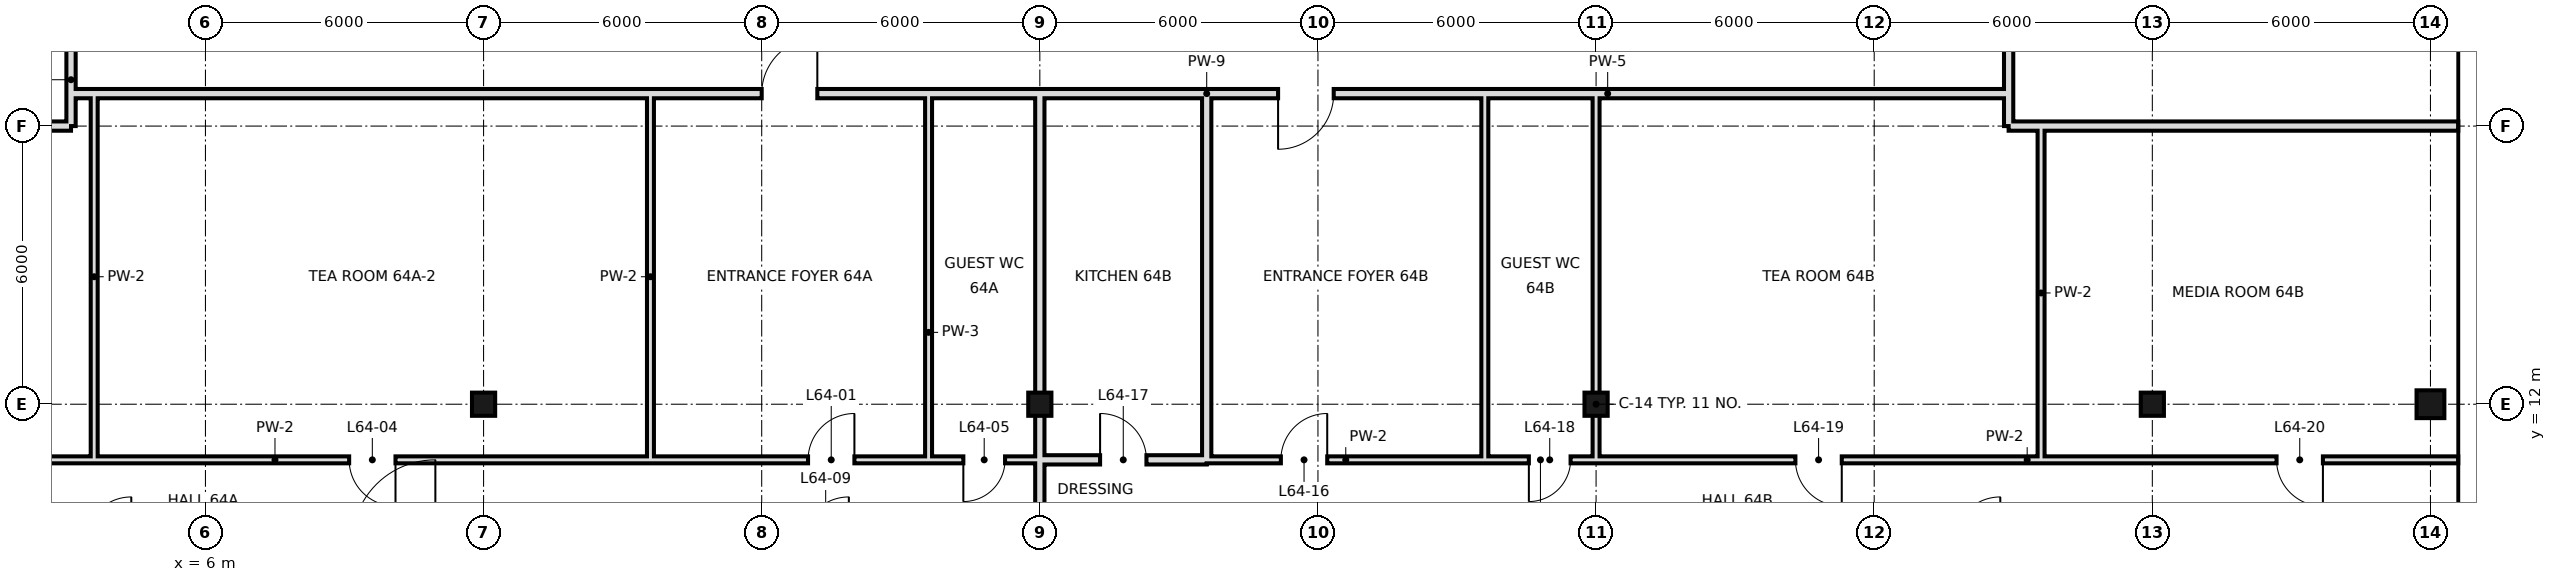
"""IFC4 building model, lengths in metres.
Left out: names, types, materials, properties, quantities, classifications, styles, units other than length and angle.
Written with IfcOpenShell. Run it as: python <this file> out.ifc"""

import sys

from ifc_helpers import new_model, si_unit, direction, frame, frame_2d, origin, origin_2d, place, context, subcontext, project, spatial, rectangle, hollow_rectangle, extrude, element, fill, save


model = new_model("IFC4")
c1 = context("Model", 3, precision=1e-05, world=origin(), true_north=direction((0.0, 1.0)))
c2 = subcontext(c1, "Body", "Model", "MODEL_VIEW")
j1 = project(units=[si_unit("LENGTHUNIT", "METRE"), si_unit("PLANEANGLEUNIT", "RADIAN")], contexts=[c1])
p1 = place(None, origin())
s1 = spatial("IfcSite", under=j1, at=p1, CompositionType="ELEMENT")
p2 = place(p1, origin())
s2 = spatial("IfcBuilding", under=s1, at=p2, CompositionType="ELEMENT")
p3 = place(p2, frame((0.0, 0.0, 270.2)))
s3 = spatial("IfcBuildingStorey", under=s2, at=p3, CompositionType="ELEMENT", Elevation=270.2)
for number, where, z_axis, x_axis in (
    (1, (12.0, 12.0, 0.0), (0.0, 0.0, 1.0), (1.0, 0.0, 0.0)),
    (2, (24.0, 12.0, 0.0), (0.0, 0.0, 1.0), (1.0, 0.0, 0.0)),
    (3, (36.0, 12.0, 0.0), (0.0, 0.0, 1.0), (1.0, 0.0, 0.0)),
    (4, (48.0, 12.0, 0.0), (0.0, 0.0, 1.0), (1.0, 0.0, 0.0)),
):
    element("IfcColumn", number, at=place(p3, frame(where, z_axis=z_axis, x_axis=x_axis)), inside=s3, PredefinedType="COLUMN", context=c2, shape_type="SweptSolid", body=[
        extrude(hollow_rectangle(XDim=0.5, YDim=0.5, WallThickness=0.025, at=origin_2d()), origin(), (0.0, 0.0, 1.0), 3.6),
    ])
p4 = place(p3, frame((54.0, 12.0, 0.0), z_axis=(0.0, 0.0, 1.0), x_axis=(1.0, 0.0, 0.0)))
e5 = element("IfcColumn", 5, at=p4, inside=s3, PredefinedType="COLUMN", context=c2, shape_type="SweptSolid", body=[
    extrude(hollow_rectangle(XDim=0.6, YDim=0.6, WallThickness=0.028, at=origin_2d()), origin(), (0.0, 0.0, 1.0), 3.6),
])
for number, where, z_axis, x_axis in (
    (6, (15.6, 10.8, 0.0), (0.0, 0.0, 1.0), (0.0, 1.0, 0.0)),
    (7, (21.6, 10.8, 0.0), (0.0, 0.0, 1.0), (0.0, 1.0, 0.0)),
):
    element("IfcWall", number, at=place(p3, frame(where, z_axis=z_axis, x_axis=x_axis)), inside=s3, PredefinedType="PARTITIONING", context=c2, shape_type="SweptSolid", body=[
        extrude(rectangle(XDim=7.9, YDim=0.15, at=frame_2d((3.95, 0.0))), origin(), (0.0, 0.0, 1.0), 3.42),
    ])
p5 = place(p3, frame((24.0, 10.8, 0.0), z_axis=(0.0, 0.0, 1.0), x_axis=(0.0, 1.0, 0.0)))
e8 = element("IfcWall", 8, at=p5, inside=s3, PredefinedType="SOLIDWALL", context=c2, shape_type="SweptSolid", body=[
    extrude(rectangle(XDim=7.9, YDim=0.2, at=frame_2d((3.95, 0.0))), origin(), (0.0, 0.0, 1.0), 2.72),
])
p6 = place(p3, frame((24.0, 0.0, 0.0), z_axis=(0.0, 0.0, 1.0), x_axis=(0.0, 1.0, 0.0)))
e9 = element("IfcWall", 9, at=p6, inside=s3, PredefinedType="SOLIDWALL", context=c2, shape_type="SweptSolid", body=[
    extrude(rectangle(XDim=10.8, YDim=0.2, at=frame_2d((5.4, 0.0))), origin(), (0.0, 0.0, 1.0), 2.72),
])
p7 = place(p3, frame((27.6, 10.8, 0.0), z_axis=(0.0, 0.0, 1.0), x_axis=(0.0, 1.0, 0.0)))
e10 = element("IfcWall", 10, at=p7, inside=s3, PredefinedType="SOLIDWALL", context=c2, shape_type="SweptSolid", body=[
    extrude(rectangle(XDim=7.9, YDim=0.2, at=frame_2d((3.95, 0.0))), origin(), (0.0, 0.0, 1.0), 2.72),
])
p8 = place(p3, frame((3.1, 18.7, 0.0), z_axis=(0.0, 0.0, 1.0), x_axis=(0.0, 1.0, 0.0)))
e11 = element("IfcWall", 11, at=p8, inside=s3, PredefinedType="SOLIDWALL", context=c2, shape_type="SweptSolid", body=[
    extrude(rectangle(XDim=21.5, YDim=0.2, at=frame_2d((10.75, 0.0))), origin(), (0.0, 0.0, 1.0), 2.97),
])
p9 = place(p8, frame((6.5, 0.0, 0.0)))
e12 = element("IfcOpeningElement", 12, at=p9, cuts=e11, PredefinedType="OPENING", context=c2, shape_type="SweptSolid", body=[
    extrude(rectangle(XDim=1.2, YDim=2.4, at=frame_2d((0.6, 1.2))), frame((0.0, 0.11, 0.0), z_axis=(0.0, -1.0, 0.0), x_axis=(1.0, 0.0, 0.0)), (0.0, 0.0, 1.0), 0.22),
])
p10 = place(p3, frame((3.1, 18.0, 0.0), z_axis=(0.0, 0.0, 1.0), x_axis=(0.0, 1.0, 0.0)))
e13 = element("IfcWall", 13, at=p10, inside=s3, PredefinedType="SOLIDWALL", context=c2, shape_type="SweptSolid", body=[
    extrude(rectangle(XDim=0.7, YDim=0.2, at=frame_2d((0.35, 0.0))), origin(), (0.0, 0.0, 1.0), 2.97),
])
for number, where, z_axis, x_axis in (
    (14, (3.6, 10.8, 0.0), (0.0, 0.0, 1.0), (0.0, 1.0, 0.0)),
    (15, (33.6, 10.8, 0.0), (0.0, 0.0, 1.0), (0.0, 1.0, 0.0)),
):
    element("IfcWall", number, at=place(p3, frame(where, z_axis=z_axis, x_axis=x_axis)), inside=s3, PredefinedType="PARTITIONING", context=c2, shape_type="SweptSolid", body=[
        extrude(rectangle(XDim=7.9, YDim=0.15, at=frame_2d((3.95, 0.0))), origin(), (0.0, 0.0, 1.0), 3.42),
    ])
p11 = place(p3, frame((36.0, 10.8, 0.0), z_axis=(0.0, 0.0, 1.0), x_axis=(0.0, 1.0, 0.0)))
e16 = element("IfcWall", 16, at=p11, inside=s3, PredefinedType="PARTITIONING", context=c2, shape_type="SweptSolid", body=[
    extrude(rectangle(XDim=7.9, YDim=0.15, at=frame_2d((3.95, 0.0))), origin(), (0.0, 0.0, 1.0), 2.72),
])
p12 = place(p3, frame((44.9, 18.0, 0.0), z_axis=(0.0, 0.0, 1.0), x_axis=(0.0, 1.0, 0.0)))
e17 = element("IfcWall", 17, at=p12, inside=s3, PredefinedType="SOLIDWALL", context=c2, shape_type="SweptSolid", body=[
    extrude(rectangle(XDim=30.6, YDim=0.2, at=frame_2d((15.3, 0.0))), origin(), (0.0, 0.0, 1.0), 2.72),
])
p13 = place(p12, frame((20.27, 0.0, 0.0)))
e18 = element("IfcOpeningElement", 18, at=p13, cuts=e17, PredefinedType="OPENING", context=c2, shape_type="SweptSolid", body=[
    extrude(rectangle(XDim=1.2, YDim=2.4, at=frame_2d((0.6, 1.2))), frame((0.0, 0.11, 0.0), z_axis=(0.0, -1.0, 0.0), x_axis=(1.0, 0.0, 0.0)), (0.0, 0.0, 1.0), 0.22),
])
p14 = place(p3, frame((45.6, 10.8, 0.0), z_axis=(0.0, 0.0, 1.0), x_axis=(0.0, 1.0, 0.0)))
e19 = element("IfcWall", 19, at=p14, inside=s3, PredefinedType="PARTITIONING", context=c2, shape_type="SweptSolid", body=[
    extrude(rectangle(XDim=7.2, YDim=0.15, at=frame_2d((3.6, 0.0))), origin(), (0.0, 0.0, 1.0), 3.42),
])
p15 = place(p3, frame((24.0, 10.8, 0.0), z_axis=(0.0, 0.0, 1.0), x_axis=(1.0, 0.0, 0.0)))
e20 = element("IfcWall", 20, at=p15, inside=s3, PredefinedType="SOLIDWALL", context=c2, shape_type="SweptSolid", body=[
    extrude(rectangle(XDim=3.6, YDim=0.2, at=frame_2d((1.8, 0.0))), origin(), (0.0, 0.0, 1.0), 2.72),
])
p16 = place(p15, frame((1.3, 0.0, 0.0)))
e21 = element("IfcOpeningElement", 21, at=p16, cuts=e20, PredefinedType="OPENING", context=c2, shape_type="SweptSolid", body=[
    extrude(rectangle(XDim=1.0, YDim=2.4, at=frame_2d((0.5, 1.2))), frame((0.0, 0.11, 0.0), z_axis=(0.0, -1.0, 0.0), x_axis=(1.0, 0.0, 0.0)), (0.0, 0.0, 1.0), 0.22),
])
p17 = place(p3, frame((-6.6, 10.8, 0.0), z_axis=(0.0, 0.0, 1.0), x_axis=(1.0, 0.0, 0.0)))
e22 = element("IfcWall", 22, at=p17, inside=s3, PredefinedType="PARTITIONING", context=c2, shape_type="SweptSolid", body=[
    extrude(rectangle(XDim=28.2, YDim=0.15, at=frame_2d((14.1, 0.0))), origin(), (0.0, 0.0, 1.0), 3.42),
])
p18 = place(p17, frame((25.6, 0.0, 0.0)))
e23 = element("IfcOpeningElement", 23, at=p18, cuts=e22, PredefinedType="OPENING", context=c2, shape_type="SweptSolid", body=[
    extrude(rectangle(XDim=1.0, YDim=2.4, at=frame_2d((0.5, 1.2))), frame((0.0, 0.085, 0.0), z_axis=(0.0, -1.0, 0.0), x_axis=(1.0, 0.0, 0.0)), (0.0, 0.0, 1.0), 0.17),
])
p19 = place(p17, frame((4.6, 0.0, 0.0)))
e24 = element("IfcOpeningElement", 24, at=p19, cuts=e22, PredefinedType="OPENING", context=c2, shape_type="SweptSolid", body=[
    extrude(rectangle(XDim=1.0, YDim=2.4, at=frame_2d((0.5, 1.2))), frame((0.0, 0.085, 0.0), z_axis=(0.0, -1.0, 0.0), x_axis=(1.0, 0.0, 0.0)), (0.0, 0.0, 1.0), 0.17),
])
p20 = place(p17, frame((15.7, 0.0, 0.0)))
e25 = element("IfcOpeningElement", 25, at=p20, cuts=e22, PredefinedType="OPENING", context=c2, shape_type="SweptSolid", body=[
    extrude(rectangle(XDim=1.0, YDim=2.4, at=frame_2d((0.5, 1.2))), frame((0.0, 0.085, 0.0), z_axis=(0.0, -1.0, 0.0), x_axis=(1.0, 0.0, 0.0)), (0.0, 0.0, 1.0), 0.17),
])
p21 = place(p3, frame((27.6, 10.8, 0.0), z_axis=(0.0, 0.0, 1.0), x_axis=(1.0, 0.0, 0.0)))
e26 = element("IfcWall", 26, at=p21, inside=s3, PredefinedType="PARTITIONING", context=c2, shape_type="SweptSolid", body=[
    extrude(rectangle(XDim=6.0, YDim=0.15, at=frame_2d((3.0, 0.0))), origin(), (0.0, 0.0, 1.0), 3.42),
])
p22 = place(p21, frame((1.6, 0.0, 0.0)))
e27 = element("IfcOpeningElement", 27, at=p22, cuts=e26, PredefinedType="OPENING", context=c2, shape_type="SweptSolid", body=[
    extrude(rectangle(XDim=1.0, YDim=2.4, at=frame_2d((0.5, 1.2))), frame((0.0, 0.085, 0.0), z_axis=(0.0, -1.0, 0.0), x_axis=(1.0, 0.0, 0.0)), (0.0, 0.0, 1.0), 0.17),
])
p23 = place(p3, frame((36.0, 10.8, 0.0), z_axis=(0.0, 0.0, 1.0), x_axis=(1.0, 0.0, 0.0)))
e28 = element("IfcWall", 28, at=p23, inside=s3, PredefinedType="PARTITIONING", context=c2, shape_type="SweptSolid", body=[
    extrude(rectangle(XDim=18.6, YDim=0.15, at=frame_2d((9.3, 0.0))), origin(), (0.0, 0.0, 1.0), 3.42),
])
p24 = place(p23, frame((4.3, 0.0, 0.0)))
e29 = element("IfcOpeningElement", 29, at=p24, cuts=e28, PredefinedType="OPENING", context=c2, shape_type="SweptSolid", body=[
    extrude(rectangle(XDim=1.0, YDim=2.4, at=frame_2d((0.5, 1.2))), frame((0.0, 0.085, 0.0), z_axis=(0.0, -1.0, 0.0), x_axis=(1.0, 0.0, 0.0)), (0.0, 0.0, 1.0), 0.17),
])
p25 = place(p23, frame((14.68, 0.0, 0.0)))
e30 = element("IfcOpeningElement", 30, at=p25, cuts=e28, PredefinedType="OPENING", context=c2, shape_type="SweptSolid", body=[
    extrude(rectangle(XDim=1.0, YDim=2.4, at=frame_2d((0.5, 1.2))), frame((0.0, 0.085, 0.0), z_axis=(0.0, -1.0, 0.0), x_axis=(1.0, 0.0, 0.0)), (0.0, 0.0, 1.0), 0.17),
])
p26 = place(p3, frame((21.6, 10.8, 0.0), z_axis=(0.0, 0.0, 1.0), x_axis=(1.0, 0.0, 0.0)))
e31 = element("IfcWall", 31, at=p26, inside=s3, PredefinedType="PARTITIONING", context=c2, shape_type="SweptSolid", body=[
    extrude(rectangle(XDim=2.4, YDim=0.15, at=frame_2d((1.2, 0.0))), origin(), (0.0, 0.0, 1.0), 3.42),
])
p27 = place(p26, frame((0.75, 0.0, 0.0)))
e32 = element("IfcOpeningElement", 32, at=p27, cuts=e31, PredefinedType="OPENING", context=c2, shape_type="SweptSolid", body=[
    extrude(rectangle(XDim=0.9, YDim=2.4, at=frame_2d((0.45, 1.2))), frame((0.0, 0.085, 0.0), z_axis=(0.0, -1.0, 0.0), x_axis=(1.0, 0.0, 0.0)), (0.0, 0.0, 1.0), 0.17),
])
p28 = place(p3, frame((33.6, 10.8, 0.0), z_axis=(0.0, 0.0, 1.0), x_axis=(1.0, 0.0, 0.0)))
e33 = element("IfcWall", 33, at=p28, inside=s3, PredefinedType="PARTITIONING", context=c2, shape_type="SweptSolid", body=[
    extrude(rectangle(XDim=2.4, YDim=0.15, at=frame_2d((1.2, 0.0))), origin(), (0.0, 0.0, 1.0), 3.42),
])
p29 = place(p28, frame((0.95, 0.0, 0.0)))
e34 = element("IfcOpeningElement", 34, at=p29, cuts=e33, PredefinedType="OPENING", context=c2, shape_type="SweptSolid", body=[
    extrude(rectangle(XDim=0.9, YDim=2.4, at=frame_2d((0.45, 1.2))), frame((0.0, 0.085, 0.0), z_axis=(0.0, -1.0, 0.0), x_axis=(1.0, 0.0, 0.0)), (0.0, 0.0, 1.0), 0.17),
])
for number, where, z_axis, x_axis in (
    (35, (44.9, 18.0, 0.0), (0.0, 0.0, 1.0), (1.0, 0.0, 0.0)),
    (36, (-6.6, 18.0, 0.0), (0.0, 0.0, 1.0), (1.0, 0.0, 0.0)),
):
    element("IfcWall", number, at=place(p3, frame(where, z_axis=z_axis, x_axis=x_axis)), inside=s3, PredefinedType="SOLIDWALL", context=c2, shape_type="SweptSolid", body=[
        extrude(rectangle(XDim=9.7, YDim=0.2, at=frame_2d((4.85, 0.0))), origin(), (0.0, 0.0, 1.0), 2.72),
    ])
p30 = place(p3, frame((3.1, 18.7, 0.0), z_axis=(0.0, 0.0, 1.0), x_axis=(1.0, 0.0, 0.0)))
e37 = element("IfcWall", 37, at=p30, inside=s3, PredefinedType="SOLIDWALL", context=c2, shape_type="SweptSolid", body=[
    extrude(rectangle(XDim=20.9, YDim=0.2, at=frame_2d((10.45, 0.0))), origin(), (0.0, 0.0, 1.0), 2.72),
])
p31 = place(p30, frame((14.9, 0.0, 0.0)))
e38 = element("IfcOpeningElement", 38, at=p31, cuts=e37, PredefinedType="OPENING", context=c2, shape_type="SweptSolid", body=[
    extrude(rectangle(XDim=1.2, YDim=2.4, at=frame_2d((0.6, 1.2))), frame((0.0, 0.11, 0.0), z_axis=(0.0, -1.0, 0.0), x_axis=(1.0, 0.0, 0.0)), (0.0, 0.0, 1.0), 0.22),
])
p32 = place(p3, frame((27.6, 18.7, 0.0), z_axis=(0.0, 0.0, 1.0), x_axis=(1.0, 0.0, 0.0)))
e39 = element("IfcWall", 39, at=p32, inside=s3, PredefinedType="SOLIDWALL", context=c2, shape_type="SweptSolid", body=[
    extrude(rectangle(XDim=17.3, YDim=0.2, at=frame_2d((8.65, 0.0))), origin(), (0.0, 0.0, 1.0), 2.72),
])
p33 = place(p32, frame((1.54, 0.0, 0.0)))
e40 = element("IfcOpeningElement", 40, at=p33, cuts=e39, PredefinedType="OPENING", context=c2, shape_type="SweptSolid", body=[
    extrude(rectangle(XDim=1.2, YDim=2.4, at=frame_2d((0.6, 1.2))), frame((0.0, 0.11, 0.0), z_axis=(0.0, -1.0, 0.0), x_axis=(1.0, 0.0, 0.0)), (0.0, 0.0, 1.0), 0.22),
])
p34 = place(p3, frame((24.0, 18.7, 0.0), z_axis=(0.0, 0.0, 1.0), x_axis=(1.0, 0.0, 0.0)))
e41 = element("IfcWall", 41, at=p34, inside=s3, PredefinedType="SOLIDWALL", context=c2, shape_type="SweptSolid", body=[
    extrude(rectangle(XDim=3.6, YDim=0.2, at=frame_2d((1.8, 0.0))), origin(), (0.0, 0.0, 1.0), 3.42),
])
p35 = place(p18, frame((1.0, 0.0, 0.0), z_axis=(0.0, 0.0, 1.0), x_axis=(-1.0, 0.0, 0.0)))
e42 = element("IfcDoor", 42, at=p35, inside=s3, OperationType="SINGLE_SWING_LEFT", PredefinedType="DOOR", context=c2, shape_type="SweptSolid", body=[
    extrude(rectangle(XDim=1.0, YDim=2.4, at=frame_2d((0.5, 1.2))), frame((0.0, 0.025, 0.0), z_axis=(0.0, -1.0, 0.0), x_axis=(1.0, 0.0, 0.0)), (0.0, 0.0, 1.0), 0.05),
])
fill(e23, e42)
p36 = place(p20, origin())
e43 = element("IfcDoor", 43, at=p36, inside=s3, OperationType="SINGLE_SWING_RIGHT", PredefinedType="DOOR", context=c2, shape_type="SweptSolid", body=[
    extrude(rectangle(XDim=1.0, YDim=2.4, at=frame_2d((0.5, 1.2))), frame((0.0, 0.025, 0.0), z_axis=(0.0, -1.0, 0.0), x_axis=(1.0, 0.0, 0.0)), (0.0, 0.0, 1.0), 0.05),
])
fill(e25, e43)
p37 = place(p27, frame((0.9, 0.0, 0.0), z_axis=(0.0, 0.0, 1.0), x_axis=(-1.0, 0.0, 0.0)))
e44 = element("IfcDoor", 44, at=p37, inside=s3, OperationType="SINGLE_SWING_RIGHT", PredefinedType="DOOR", context=c2, shape_type="SweptSolid", body=[
    extrude(rectangle(XDim=0.9, YDim=2.4, at=frame_2d((0.45, 1.2))), frame((0.0, 0.025, 0.0), z_axis=(0.0, -1.0, 0.0), x_axis=(1.0, 0.0, 0.0)), (0.0, 0.0, 1.0), 0.05),
])
fill(e32, e44)
p38 = place(p22, frame((1.0, 0.0, 0.0), z_axis=(0.0, 0.0, 1.0), x_axis=(-1.0, 0.0, 0.0)))
e45 = element("IfcDoor", 45, at=p38, inside=s3, OperationType="SINGLE_SWING_LEFT", PredefinedType="DOOR", context=c2, shape_type="SweptSolid", body=[
    extrude(rectangle(XDim=1.0, YDim=2.4, at=frame_2d((0.5, 1.2))), frame((0.0, 0.025, 0.0), z_axis=(0.0, -1.0, 0.0), x_axis=(1.0, 0.0, 0.0)), (0.0, 0.0, 1.0), 0.05),
])
fill(e27, e45)
p39 = place(p16, origin())
e46 = element("IfcDoor", 46, at=p39, inside=s3, OperationType="SINGLE_SWING_LEFT", PredefinedType="DOOR", context=c2, shape_type="SweptSolid", body=[
    extrude(rectangle(XDim=1.0, YDim=2.4, at=frame_2d((0.5, 1.2))), frame((0.0, 0.025, 0.0), z_axis=(0.0, -1.0, 0.0), x_axis=(1.0, 0.0, 0.0)), (0.0, 0.0, 1.0), 0.05),
])
fill(e21, e46)
p40 = place(p29, frame((0.9, 0.0, 0.0), z_axis=(0.0, 0.0, 1.0), x_axis=(-1.0, 0.0, 0.0)))
e47 = element("IfcDoor", 47, at=p40, inside=s3, OperationType="SINGLE_SWING_RIGHT", PredefinedType="DOOR", context=c2, shape_type="SweptSolid", body=[
    extrude(rectangle(XDim=0.9, YDim=2.4, at=frame_2d((0.45, 1.2))), frame((0.0, 0.025, 0.0), z_axis=(0.0, -1.0, 0.0), x_axis=(1.0, 0.0, 0.0)), (0.0, 0.0, 1.0), 0.05),
])
fill(e34, e47)
p41 = place(p24, origin())
e48 = element("IfcDoor", 48, at=p41, inside=s3, OperationType="SINGLE_SWING_RIGHT", PredefinedType="DOOR", context=c2, shape_type="SweptSolid", body=[
    extrude(rectangle(XDim=1.0, YDim=2.4, at=frame_2d((0.5, 1.2))), frame((0.0, 0.025, 0.0), z_axis=(0.0, -1.0, 0.0), x_axis=(1.0, 0.0, 0.0)), (0.0, 0.0, 1.0), 0.05),
])
fill(e29, e48)
p42 = place(p25, origin())
e49 = element("IfcDoor", 49, at=p42, inside=s3, OperationType="SINGLE_SWING_RIGHT", PredefinedType="DOOR", context=c2, shape_type="SweptSolid", body=[
    extrude(rectangle(XDim=1.0, YDim=2.4, at=frame_2d((0.5, 1.2))), frame((0.0, 0.025, 0.0), z_axis=(0.0, -1.0, 0.0), x_axis=(1.0, 0.0, 0.0)), (0.0, 0.0, 1.0), 0.05),
])
fill(e30, e49)
p43 = place(p31, frame((1.2, 0.0, 0.0), z_axis=(0.0, 0.0, 1.0), x_axis=(-1.0, 0.0, 0.0)))
e50 = element("IfcDoor", 50, at=p43, inside=s3, OperationType="SINGLE_SWING_LEFT", PredefinedType="DOOR", context=c2, shape_type="SweptSolid", body=[
    extrude(rectangle(XDim=1.2, YDim=2.4, at=frame_2d((0.6, 1.2))), frame((0.0, 0.025, 0.0), z_axis=(0.0, -1.0, 0.0), x_axis=(1.0, 0.0, 0.0)), (0.0, 0.0, 1.0), 0.05),
])
fill(e38, e50)
p44 = place(p33, frame((1.2, 0.0, 0.0), z_axis=(0.0, 0.0, 1.0), x_axis=(-1.0, 0.0, 0.0)))
e51 = element("IfcDoor", 51, at=p44, inside=s3, OperationType="SINGLE_SWING_RIGHT", PredefinedType="DOOR", context=c2, shape_type="SweptSolid", body=[
    extrude(rectangle(XDim=1.2, YDim=2.4, at=frame_2d((0.6, 1.2))), frame((0.0, 0.025, 0.0), z_axis=(0.0, -1.0, 0.0), x_axis=(1.0, 0.0, 0.0)), (0.0, 0.0, 1.0), 0.05),
])
fill(e40, e51)
save(model, sys.argv[1])
